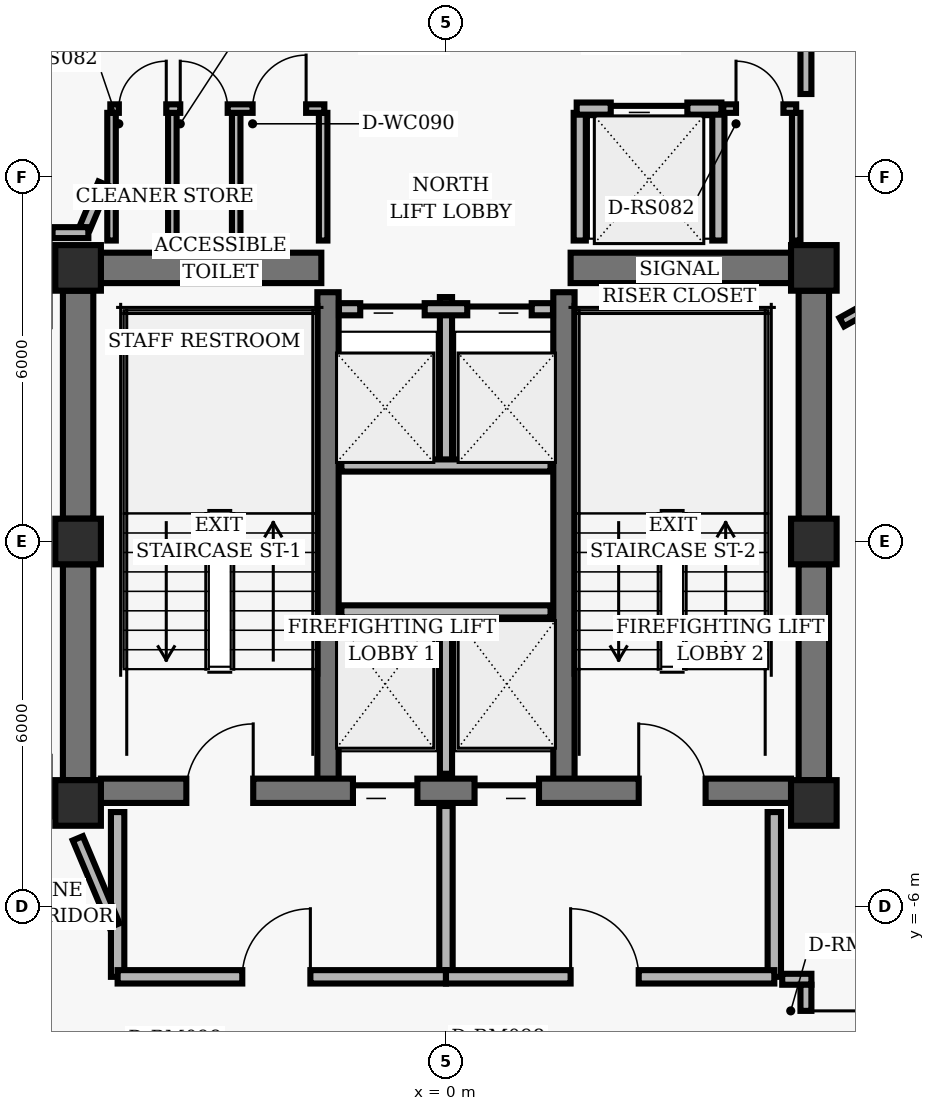
"""IFC4 building model, lengths in metres.
Left out: names, types, materials, properties, quantities, classifications, styles, units other than length and angle.
Written with IfcOpenShell. Run it as: python <this file> out.ifc"""

import sys

from ifc_helpers import new_model, si_unit, direction, frame, frame_2d, origin, origin_2d, place, context, subcontext, project, spatial, rectangle, hollow_rectangle, extrude, element, fill, save


model = new_model("IFC4")
c1 = context("Model", 3, precision=1e-05, world=origin(), true_north=direction((0.0, 1.0)))
c2 = subcontext(c1, "Body", "Model", "MODEL_VIEW")
j1 = project(units=[si_unit("LENGTHUNIT", "METRE"), si_unit("PLANEANGLEUNIT", "RADIAN")], contexts=[c1])
p1 = place(None, origin())
s1 = spatial("IfcSite", under=j1, at=p1, CompositionType="ELEMENT")
p2 = place(p1, origin())
s2 = spatial("IfcBuilding", under=s1, at=p2, CompositionType="ELEMENT")
p3 = place(p2, frame((0.0, 0.0, 181.44)))
s3 = spatial("IfcBuildingStorey", under=s2, at=p3, CompositionType="ELEMENT", Elevation=181.44)
for number, where, z_axis, x_axis in (
    (1, (-6.05, 4.5, 0.0), (0.0, 0.0, 1.0), (1.0, 0.0, 0.0)),
    (2, (6.05, 4.5, 0.0), (0.0, 0.0, 1.0), (1.0, 0.0, 0.0)),
    (3, (-6.05, 0.0, 0.0), (0.0, 0.0, 1.0), (1.0, 0.0, 0.0)),
    (4, (6.05, 0.0, 0.0), (0.0, 0.0, 1.0), (1.0, 0.0, 0.0)),
    (5, (-6.05, -4.3, 0.0), (0.0, 0.0, 1.0), (1.0, 0.0, 0.0)),
    (6, (6.05, -4.3, 0.0), (0.0, 0.0, 1.0), (1.0, 0.0, 0.0)),
):
    element("IfcColumn", number, at=place(p3, frame(where, z_axis=z_axis, x_axis=x_axis)), inside=s3, PredefinedType="COLUMN", context=c2, shape_type="SweptSolid", body=[
        extrude(hollow_rectangle(XDim=0.75, YDim=0.75, WallThickness=0.05, InnerFilletRadius=0.02, OuterFilletRadius=0.04, at=origin_2d()), origin(), (0.0, 0.0, 1.0), 3.04),
    ])
p4 = place(p3, frame((-6.05, 0.375, 0.0), z_axis=(0.0, 0.0, 1.0), x_axis=(0.0, 1.0, 0.0)))
e7 = element("IfcWall", 7, at=p4, inside=s3, PredefinedType="SHEAR", context=c2, shape_type="SweptSolid", body=[
    extrude(rectangle(XDim=3.75, YDim=0.5, at=frame_2d((1.875, 0.0))), origin(), (0.0, 0.0, 1.0), 2.798),
])
p5 = place(p3, frame((-6.05, -3.925, 0.0), z_axis=(0.0, 0.0, 1.0), x_axis=(0.0, 1.0, 0.0)))
e8 = element("IfcWall", 8, at=p5, inside=s3, PredefinedType="SHEAR", context=c2, shape_type="SweptSolid", body=[
    extrude(rectangle(XDim=3.55, YDim=0.5, at=frame_2d((1.775, 0.0))), origin(), (0.0, 0.0, 1.0), 2.798),
])
p6 = place(p3, frame((6.05, 0.375, 0.0), z_axis=(0.0, 0.0, 1.0), x_axis=(0.0, 1.0, 0.0)))
e9 = element("IfcWall", 9, at=p6, inside=s3, PredefinedType="SHEAR", context=c2, shape_type="SweptSolid", body=[
    extrude(rectangle(XDim=3.75, YDim=0.5, at=frame_2d((1.875, 0.0))), origin(), (0.0, 0.0, 1.0), 2.798),
])
p7 = place(p3, frame((6.05, -3.925, 0.0), z_axis=(0.0, 0.0, 1.0), x_axis=(0.0, 1.0, 0.0)))
e10 = element("IfcWall", 10, at=p7, inside=s3, PredefinedType="SHEAR", context=c2, shape_type="SweptSolid", body=[
    extrude(rectangle(XDim=3.55, YDim=0.5, at=frame_2d((1.775, 0.0))), origin(), (0.0, 0.0, 1.0), 2.798),
])
for number, where, z_axis, x_axis in (
    (11, (-1.94, -4.1, 0.0), (0.0, 0.0, 1.0), (0.0, 1.0, 0.0)),
    (12, (1.94, -4.1, 0.0), (0.0, 0.0, 1.0), (0.0, 1.0, 0.0)),
):
    element("IfcWall", number, at=place(p3, frame(where, z_axis=z_axis, x_axis=x_axis)), inside=s3, PredefinedType="SHEAR", context=c2, shape_type="SweptSolid", body=[
        extrude(rectangle(XDim=8.2, YDim=0.35, at=frame_2d((4.1, 0.0))), origin(), (0.0, 0.0, 1.0), 2.798),
    ])
p8 = place(p3, frame((-5.675, -4.1, 0.0), z_axis=(0.0, 0.0, 1.0), x_axis=(1.0, 0.0, 0.0)))
e13 = element("IfcWall", 13, at=p8, inside=s3, PredefinedType="SHEAR", context=c2, shape_type="SweptSolid", body=[
    extrude(rectangle(XDim=11.35, YDim=0.4, at=frame_2d((5.675, 0.0))), origin(), (0.0, 0.0, 1.0), 2.798),
])
p9 = place(p8, frame((1.405, 0.0, 0.0)))
e14 = element("IfcOpeningElement", 14, at=p9, cuts=e13, PredefinedType="OPENING", context=c2, shape_type="SweptSolid", body=[
    extrude(rectangle(XDim=1.1, YDim=2.04, at=frame_2d((0.55, 1.02))), frame((0.0, 0.21, 0.0), z_axis=(0.0, -1.0, 0.0), x_axis=(1.0, 0.0, 0.0)), (0.0, 0.0, 1.0), 0.42),
])
p10 = place(p8, frame((8.845, 0.0, 0.0)))
e15 = element("IfcOpeningElement", 15, at=p10, cuts=e13, PredefinedType="OPENING", context=c2, shape_type="SweptSolid", body=[
    extrude(rectangle(XDim=1.1, YDim=2.04, at=frame_2d((0.55, 1.02))), frame((0.0, 0.21, 0.0), z_axis=(0.0, -1.0, 0.0), x_axis=(1.0, 0.0, 0.0)), (0.0, 0.0, 1.0), 0.42),
])
p11 = place(p8, frame((4.145, 0.0, 0.0)))
e16 = element("IfcOpeningElement", 16, at=p11, cuts=e13, PredefinedType="OPENING", context=c2, shape_type="SweptSolid", body=[
    extrude(rectangle(XDim=1.06, YDim=2.04, at=frame_2d((0.53, 1.02))), frame((0.0, 0.21, 0.0), z_axis=(0.0, -1.0, 0.0), x_axis=(1.0, 0.0, 0.0)), (0.0, 0.0, 1.0), 0.42),
])
p12 = place(p8, frame((6.145, 0.0, 0.0)))
e17 = element("IfcOpeningElement", 17, at=p12, cuts=e13, PredefinedType="OPENING", context=c2, shape_type="SweptSolid", body=[
    extrude(rectangle(XDim=1.06, YDim=2.04, at=frame_2d((0.53, 1.02))), frame((0.0, 0.21, 0.0), z_axis=(0.0, -1.0, 0.0), x_axis=(1.0, 0.0, 0.0)), (0.0, 0.0, 1.0), 0.42),
])
for number, where, z_axis, x_axis in (
    (18, (-5.675, 4.5, 0.0), (0.0, 0.0, 1.0), (1.0, 0.0, 0.0)),
    (19, (2.05, 4.5, 0.0), (0.0, 0.0, 1.0), (1.0, 0.0, 0.0)),
):
    element("IfcWall", number, at=place(p3, frame(where, z_axis=z_axis, x_axis=x_axis)), inside=s3, PredefinedType="SHEAR", context=c2, shape_type="SweptSolid", body=[
        extrude(rectangle(XDim=3.625, YDim=0.5, at=frame_2d((1.812, 0.0))), origin(), (0.0, 0.0, 1.0), 2.798),
    ])
p13 = place(p3, frame((0.0, -3.82, 0.0), z_axis=(0.0, 0.0, 1.0), x_axis=(0.0, 1.0, 0.0)))
e20 = element("IfcWall", 20, at=p13, inside=s3, PredefinedType="PARTITIONING", context=c2, shape_type="SweptSolid", body=[
    extrude(rectangle(XDim=2.67, YDim=0.2, at=frame_2d((1.335, 0.0))), origin(), (0.0, 0.0, 1.0), 2.773),
])
p14 = place(p3, frame((-1.72, -1.15, 0.0), z_axis=(0.0, 0.0, 1.0), x_axis=(1.0, 0.0, 0.0)))
e21 = element("IfcWall", 21, at=p14, inside=s3, PredefinedType="PARTITIONING", context=c2, shape_type="SweptSolid", body=[
    extrude(rectangle(XDim=3.44, YDim=0.2, at=frame_2d((1.72, 0.0))), origin(), (0.0, 0.0, 1.0), 2.773),
])
for number, where, z_axis, x_axis in (
    (22, (-5.4, -7.16, 0.0), (0.0, 0.0, 1.0), (0.0, 1.0, 0.0)),
    (23, (5.4, -7.16, 0.0), (0.0, 0.0, 1.0), (0.0, 1.0, 0.0)),
):
    element("IfcWall", number, at=place(p3, frame(where, z_axis=z_axis, x_axis=x_axis)), inside=s3, PredefinedType="PARTITIONING", context=c2, shape_type="SweptSolid", body=[
        extrude(rectangle(XDim=2.71, YDim=0.22, at=frame_2d((1.355, 0.0))), origin(), (0.0, 0.0, 1.0), 2.773),
    ])
p15 = place(p3, frame((0.0, -7.16, 0.0), z_axis=(0.0, 0.0, 1.0), x_axis=(0.0, 1.0, 0.0)))
e24 = element("IfcWall", 24, at=p15, inside=s3, PredefinedType="PARTITIONING", context=c2, shape_type="SweptSolid", body=[
    extrude(rectangle(XDim=2.81, YDim=0.22, at=frame_2d((1.405, 0.0))), origin(), (0.0, 0.0, 1.0), 2.773),
])
p16 = place(p3, frame((-5.4, -7.16, 0.0), z_axis=(0.0, 0.0, 1.0), x_axis=(1.0, 0.0, 0.0)))
e25 = element("IfcWall", 25, at=p16, inside=s3, PredefinedType="PARTITIONING", context=c2, shape_type="SweptSolid", body=[
    extrude(rectangle(XDim=5.4, YDim=0.22, at=frame_2d((2.7, 0.0))), origin(), (0.0, 0.0, 1.0), 2.395),
])
p17 = place(p16, frame((2.05, 0.0, 0.0)))
e26 = element("IfcOpeningElement", 26, at=p17, cuts=e25, PredefinedType="OPENING", context=c2, shape_type="SweptSolid", body=[
    extrude(rectangle(XDim=1.12, YDim=2.02, at=frame_2d((0.56, 1.01))), frame((0.0, 0.12, 0.0), z_axis=(0.0, -1.0, 0.0), x_axis=(1.0, 0.0, 0.0)), (0.0, 0.0, 1.0), 0.24),
])
p18 = place(p3, frame((0.0, -7.16, 0.0), z_axis=(0.0, 0.0, 1.0), x_axis=(1.0, 0.0, 0.0)))
e27 = element("IfcWall", 27, at=p18, inside=s3, PredefinedType="PARTITIONING", context=c2, shape_type="SweptSolid", body=[
    extrude(rectangle(XDim=5.4, YDim=0.22, at=frame_2d((2.7, 0.0))), origin(), (0.0, 0.0, 1.0), 2.395),
])
p19 = place(p18, frame((2.05, 0.0, 0.0)))
e28 = element("IfcOpeningElement", 28, at=p19, cuts=e27, PredefinedType="OPENING", context=c2, shape_type="SweptSolid", body=[
    extrude(rectangle(XDim=1.12, YDim=2.02, at=frame_2d((0.56, 1.01))), frame((0.0, 0.12, 0.0), z_axis=(0.0, -1.0, 0.0), x_axis=(1.0, 0.0, 0.0)), (0.0, 0.0, 1.0), 0.24),
])
p20 = place(p3, frame((0.0, 1.25, 0.0), z_axis=(0.0, 0.0, 1.0), x_axis=(0.0, 1.0, 0.0)))
e29 = element("IfcWall", 29, at=p20, inside=s3, PredefinedType="PARTITIONING", context=c2, shape_type="SweptSolid", body=[
    extrude(rectangle(XDim=2.77, YDim=0.2, at=frame_2d((1.385, 0.0))), origin(), (0.0, 0.0, 1.0), 2.773),
])
p21 = place(p3, frame((-1.72, 1.25, 0.0), z_axis=(0.0, 0.0, 1.0), x_axis=(1.0, 0.0, 0.0)))
e30 = element("IfcWall", 30, at=p21, inside=s3, PredefinedType="PARTITIONING", context=c2, shape_type="SweptSolid", body=[
    extrude(rectangle(XDim=3.44, YDim=0.2, at=frame_2d((1.72, 0.0))), origin(), (0.0, 0.0, 1.0), 2.773),
])
p22 = place(p3, frame((-1.76, 3.82, 0.0), z_axis=(0.0, 0.0, 1.0), x_axis=(1.0, 0.0, 0.0)))
e31 = element("IfcWall", 31, at=p22, inside=s3, PredefinedType="PARTITIONING", context=c2, shape_type="SweptSolid", body=[
    extrude(rectangle(XDim=3.52, YDim=0.2, at=frame_2d((1.76, 0.0))), origin(), (0.0, 0.0, 1.0), 2.773),
])
p23 = place(p22, frame((0.35, 0.0, 0.0)))
e32 = element("IfcOpeningElement", 32, at=p23, cuts=e31, PredefinedType="OPENING", context=c2, shape_type="SweptSolid", body=[
    extrude(rectangle(XDim=1.06, YDim=2.04, at=frame_2d((0.53, 1.02))), frame((0.0, 0.11, 0.0), z_axis=(0.0, -1.0, 0.0), x_axis=(1.0, 0.0, 0.0)), (0.0, 0.0, 1.0), 0.22),
])
p24 = place(p22, frame((2.11, 0.0, 0.0)))
e33 = element("IfcOpeningElement", 33, at=p24, cuts=e31, PredefinedType="OPENING", context=c2, shape_type="SweptSolid", body=[
    extrude(rectangle(XDim=1.06, YDim=2.04, at=frame_2d((0.53, 1.02))), frame((0.0, 0.11, 0.0), z_axis=(0.0, -1.0, 0.0), x_axis=(1.0, 0.0, 0.0)), (0.0, 0.0, 1.0), 0.22),
])
for number, where, z_axis, x_axis in (
    (34, (2.2, 4.95, 0.0), (0.0, 0.0, 1.0), (0.0, 1.0, 0.0)),
    (35, (4.48, 4.95, 0.0), (0.0, 0.0, 1.0), (0.0, 1.0, 0.0)),
):
    element("IfcWall", number, at=place(p3, frame(where, z_axis=z_axis, x_axis=x_axis)), inside=s3, PredefinedType="PARTITIONING", context=c2, shape_type="SweptSolid", body=[
        extrude(rectangle(XDim=2.1, YDim=0.2, at=frame_2d((1.05, 0.0))), origin(), (0.0, 0.0, 1.0), 2.773),
    ])
p25 = place(p3, frame((2.15, 7.12, 0.0), z_axis=(0.0, 0.0, 1.0), x_axis=(1.0, 0.0, 0.0)))
e36 = element("IfcWall", 36, at=p25, inside=s3, PredefinedType="PARTITIONING", context=c2, shape_type="SweptSolid", body=[
    extrude(rectangle(XDim=2.38, YDim=0.2, at=frame_2d((1.19, 0.0))), origin(), (0.0, 0.0, 1.0), 2.773),
])
p26 = place(p25, frame((0.56, 0.0, 0.0)))
e37 = element("IfcOpeningElement", 37, at=p26, cuts=e36, PredefinedType="OPENING", context=c2, shape_type="SweptSolid", body=[
    extrude(rectangle(XDim=1.26, YDim=2.06, at=frame_2d((0.63, 1.03))), frame((0.0, 0.11, 0.0), z_axis=(0.0, -1.0, 0.0), x_axis=(1.0, 0.0, 0.0)), (0.0, 0.0, 1.0), 0.22),
])
for number, where, z_axis, x_axis in (
    (38, (-5.5, 4.95, 0.0), (0.0, 0.0, 1.0), (0.0, 1.0, 0.0)),
    (39, (-4.5, 4.95, 0.0), (0.0, 0.0, 1.0), (0.0, 1.0, 0.0)),
    (40, (-3.45, 4.95, 0.0), (0.0, 0.0, 1.0), (0.0, 1.0, 0.0)),
    (41, (-2.02, 4.95, 0.0), (0.0, 0.0, 1.0), (0.0, 1.0, 0.0)),
):
    element("IfcWall", number, at=place(p3, frame(where, z_axis=z_axis, x_axis=x_axis)), inside=s3, PredefinedType="PARTITIONING", context=c2, shape_type="SweptSolid", body=[
        extrude(rectangle(XDim=2.1, YDim=0.14, at=frame_2d((1.05, 0.0))), origin(), (0.0, 0.0, 1.0), 2.773),
    ])
p27 = place(p3, frame((-5.52, 7.12, 0.0), z_axis=(0.0, 0.0, 1.0), x_axis=(1.0, 0.0, 0.0)))
e42 = element("IfcWall", 42, at=p27, inside=s3, PredefinedType="PARTITIONING", context=c2, shape_type="SweptSolid", body=[
    extrude(rectangle(XDim=3.52, YDim=0.14, at=frame_2d((1.76, 0.0))), origin(), (0.0, 0.0, 1.0), 2.773),
])
p28 = place(p27, frame((0.14, 0.0, 0.0)))
e43 = element("IfcOpeningElement", 43, at=p28, cuts=e42, PredefinedType="OPENING", context=c2, shape_type="SweptSolid", body=[
    extrude(rectangle(XDim=0.78, YDim=2.01, at=frame_2d((0.39, 1.005))), frame((0.0, 0.08, 0.0), z_axis=(0.0, -1.0, 0.0), x_axis=(1.0, 0.0, 0.0)), (0.0, 0.0, 1.0), 0.16),
])
p29 = place(p27, frame((1.15, 0.0, 0.0)))
e44 = element("IfcOpeningElement", 44, at=p29, cuts=e42, PredefinedType="OPENING", context=c2, shape_type="SweptSolid", body=[
    extrude(rectangle(XDim=0.78, YDim=2.01, at=frame_2d((0.39, 1.005))), frame((0.0, 0.08, 0.0), z_axis=(0.0, -1.0, 0.0), x_axis=(1.0, 0.0, 0.0)), (0.0, 0.0, 1.0), 0.16),
])
p30 = place(p27, frame((2.34, 0.0, 0.0)))
e45 = element("IfcOpeningElement", 45, at=p30, cuts=e42, PredefinedType="OPENING", context=c2, shape_type="SweptSolid", body=[
    extrude(rectangle(XDim=0.88, YDim=2.02, at=frame_2d((0.44, 1.01))), frame((0.0, 0.08, 0.0), z_axis=(0.0, -1.0, 0.0), x_axis=(1.0, 0.0, 0.0)), (0.0, 0.0, 1.0), 0.16),
])
p31 = place(p3, frame((5.76, 4.95, 0.0), z_axis=(0.0, 0.0, 1.0), x_axis=(0.0, 1.0, 0.0)))
e46 = element("IfcWall", 46, at=p31, inside=s3, PredefinedType="PARTITIONING", context=c2, shape_type="SweptSolid", body=[
    extrude(rectangle(XDim=2.1, YDim=0.14, at=frame_2d((1.05, 0.0))), origin(), (0.0, 0.0, 1.0), 2.253),
])
p32 = place(p3, frame((4.56, 7.12, 0.0), z_axis=(0.0, 0.0, 1.0), x_axis=(1.0, 0.0, 0.0)))
e47 = element("IfcWall", 47, at=p32, inside=s3, PredefinedType="PARTITIONING", context=c2, shape_type="SweptSolid", body=[
    extrude(rectangle(XDim=1.2, YDim=0.14, at=frame_2d((0.6, 0.0))), origin(), (0.0, 0.0, 1.0), 2.773),
])
p33 = place(p32, frame((0.21, 0.0, 0.0)))
e48 = element("IfcOpeningElement", 48, at=p33, cuts=e47, PredefinedType="OPENING", context=c2, shape_type="SweptSolid", body=[
    extrude(rectangle(XDim=0.78, YDim=2.01, at=frame_2d((0.39, 1.005))), frame((0.0, 0.08, 0.0), z_axis=(0.0, -1.0, 0.0), x_axis=(1.0, 0.0, 0.0)), (0.0, 0.0, 1.0), 0.16),
])
p34 = place(p3, frame((5.92, 9.16, 0.0), z_axis=(0.0, 0.0, 1.0), x_axis=(0.0, -1.0, 0.0)))
e49 = element("IfcWall", 49, at=p34, inside=s3, PredefinedType="PARTITIONING", context=c2, shape_type="SweptSolid", body=[
    extrude(rectangle(XDim=1.8, YDim=0.18, at=frame_2d((0.9, 0.0))), origin(), (0.0, 0.0, 1.0), 2.253),
])
p35 = place(p3, frame((-5.632, 5.887, 0.0), z_axis=(0.0, 0.0, 1.0), x_axis=(-0.387792833522, -0.921746558588, 0.0)))
e50 = element("IfcWall", 50, at=p35, inside=s3, PredefinedType="PARTITIONING", context=c2, shape_type="SweptSolid", body=[
    extrude(rectangle(XDim=0.785, YDim=0.18, at=frame_2d((0.393, 0.0))), origin(), (0.0, 0.0, 1.0), 2.773),
])
p36 = place(p3, frame((-5.881, 5.08, 0.0), z_axis=(0.0, 0.0, 1.0), x_axis=(-1.0, 0.0, 0.0)))
e51 = element("IfcWall", 51, at=p36, inside=s3, PredefinedType="PARTITIONING", context=c2, shape_type="SweptSolid", body=[
    extrude(rectangle(XDim=0.589, YDim=0.18, at=frame_2d((0.294, 0.0))), origin(), (0.0, 0.0, 1.0), 2.773),
])
p37 = place(p3, frame((-6.055, -4.882, 0.0), z_axis=(0.0, 0.0, 1.0), x_axis=(0.387579540458, -0.921836265189, 0.0)))
e52 = element("IfcWall", 52, at=p37, inside=s3, PredefinedType="PARTITIONING", context=c2, shape_type="SweptSolid", body=[
    extrude(rectangle(XDim=1.555, YDim=0.18, at=frame_2d((0.777, 0.0))), origin(), (0.0, 0.0, 1.0), 2.773),
])
p38 = place(p3, frame((5.53, -7.2, 0.0), z_axis=(0.0, 0.0, 1.0), x_axis=(1.0, 0.0, 0.0)))
e53 = element("IfcWall", 53, at=p38, inside=s3, PredefinedType="PARTITIONING", context=c2, shape_type="SweptSolid", body=[
    extrude(rectangle(XDim=0.48, YDim=0.18, at=frame_2d((0.24, 0.0))), origin(), (0.0, 0.0, 1.0), 2.773),
])
p39 = place(p3, frame((5.92, -7.29, 0.0), z_axis=(0.0, 0.0, 1.0), x_axis=(0.0, -1.0, 0.0)))
e54 = element("IfcWall", 54, at=p39, inside=s3, PredefinedType="PARTITIONING", context=c2, shape_type="SweptSolid", body=[
    extrude(rectangle(XDim=1.82, YDim=0.18, at=frame_2d((0.91, 0.0))), origin(), (0.0, 0.0, 1.0), 2.773),
])
p40 = place(p39, frame((0.43, 0.0, 0.0)))
e55 = element("IfcOpeningElement", 55, at=p40, cuts=e54, PredefinedType="OPENING", context=c2, shape_type="SweptSolid", body=[
    extrude(rectangle(XDim=0.96, YDim=2.02, at=frame_2d((0.48, 1.01))), frame((0.0, 0.1, 0.0), z_axis=(0.0, -1.0, 0.0), x_axis=(1.0, 0.0, 0.0)), (0.0, 0.0, 1.0), 0.2),
])
p41 = place(p3, frame((6.51, 3.609, 0.0), z_axis=(0.0, 0.0, 1.0), x_axis=(0.874634801292, 0.484782388675, 0.0)))
e56 = element("IfcWall", 56, at=p41, inside=s3, PredefinedType="PARTITIONING", context=c2, shape_type="SweptSolid", body=[
    extrude(rectangle(XDim=5.879, YDim=0.16, at=frame_2d((2.939, 0.0))), origin(), (0.0, 0.0, 1.0), 2.773),
])
p42 = place(p9, origin())
e57 = element("IfcDoor", 57, at=p42, inside=s3, OperationType="SINGLE_SWING_RIGHT", PredefinedType="DOOR", context=c2, shape_type="SweptSolid", body=[
    extrude(rectangle(XDim=1.1, YDim=2.04, at=frame_2d((0.55, 1.02))), frame((0.0, 0.025, 0.0), z_axis=(0.0, -1.0, 0.0), x_axis=(1.0, 0.0, 0.0)), (0.0, 0.0, 1.0), 0.05),
])
fill(e14, e57)
p43 = place(p10, origin())
e58 = element("IfcDoor", 58, at=p43, inside=s3, OperationType="SINGLE_SWING_LEFT", PredefinedType="DOOR", context=c2, shape_type="SweptSolid", body=[
    extrude(rectangle(XDim=1.1, YDim=2.04, at=frame_2d((0.55, 1.02))), frame((0.0, 0.025, 0.0), z_axis=(0.0, -1.0, 0.0), x_axis=(1.0, 0.0, 0.0)), (0.0, 0.0, 1.0), 0.05),
])
fill(e15, e58)
p44 = place(p11, origin())
e59 = element("IfcDoor", 59, at=p44, inside=s3, OperationType="SLIDING_TO_LEFT", PredefinedType="DOOR", context=c2, shape_type="SweptSolid", body=[
    extrude(rectangle(XDim=1.06, YDim=2.04, at=frame_2d((0.53, 1.02))), frame((0.0, 0.025, 0.0), z_axis=(0.0, -1.0, 0.0), x_axis=(1.0, 0.0, 0.0)), (0.0, 0.0, 1.0), 0.05),
])
fill(e16, e59)
p45 = place(p12, origin())
e60 = element("IfcDoor", 60, at=p45, inside=s3, OperationType="SLIDING_TO_RIGHT", PredefinedType="DOOR", context=c2, shape_type="SweptSolid", body=[
    extrude(rectangle(XDim=1.06, YDim=2.04, at=frame_2d((0.53, 1.02))), frame((0.0, 0.025, 0.0), z_axis=(0.0, -1.0, 0.0), x_axis=(1.0, 0.0, 0.0)), (0.0, 0.0, 1.0), 0.05),
])
fill(e17, e60)
p46 = place(p17, origin())
e61 = element("IfcDoor", 61, at=p46, inside=s3, OperationType="SINGLE_SWING_RIGHT", PredefinedType="DOOR", context=c2, shape_type="SweptSolid", body=[
    extrude(rectangle(XDim=1.12, YDim=2.02, at=frame_2d((0.56, 1.01))), frame((0.0, 0.025, 0.0), z_axis=(0.0, -1.0, 0.0), x_axis=(1.0, 0.0, 0.0)), (0.0, 0.0, 1.0), 0.05),
])
fill(e26, e61)
p47 = place(p19, origin())
e62 = element("IfcDoor", 62, at=p47, inside=s3, OperationType="SINGLE_SWING_LEFT", PredefinedType="DOOR", context=c2, shape_type="SweptSolid", body=[
    extrude(rectangle(XDim=1.12, YDim=2.02, at=frame_2d((0.56, 1.01))), frame((0.0, 0.025, 0.0), z_axis=(0.0, -1.0, 0.0), x_axis=(1.0, 0.0, 0.0)), (0.0, 0.0, 1.0), 0.05),
])
fill(e28, e62)
p48 = place(p23, origin())
e63 = element("IfcDoor", 63, at=p48, inside=s3, OperationType="SLIDING_TO_LEFT", PredefinedType="DOOR", context=c2, shape_type="SweptSolid", body=[
    extrude(rectangle(XDim=1.06, YDim=2.04, at=frame_2d((0.53, 1.02))), frame((0.0, 0.025, 0.0), z_axis=(0.0, -1.0, 0.0), x_axis=(1.0, 0.0, 0.0)), (0.0, 0.0, 1.0), 0.05),
])
fill(e32, e63)
p49 = place(p24, origin())
e64 = element("IfcDoor", 64, at=p49, inside=s3, OperationType="SLIDING_TO_RIGHT", PredefinedType="DOOR", context=c2, shape_type="SweptSolid", body=[
    extrude(rectangle(XDim=1.06, YDim=2.04, at=frame_2d((0.53, 1.02))), frame((0.0, 0.025, 0.0), z_axis=(0.0, -1.0, 0.0), x_axis=(1.0, 0.0, 0.0)), (0.0, 0.0, 1.0), 0.05),
])
fill(e33, e64)
p50 = place(p26, origin())
e65 = element("IfcDoor", 65, at=p50, inside=s3, OperationType="SLIDING_TO_LEFT", PredefinedType="DOOR", context=c2, shape_type="SweptSolid", body=[
    extrude(rectangle(XDim=1.26, YDim=2.06, at=frame_2d((0.63, 1.03))), frame((0.0, 0.025, 0.0), z_axis=(0.0, -1.0, 0.0), x_axis=(1.0, 0.0, 0.0)), (0.0, 0.0, 1.0), 0.05),
])
fill(e37, e65)
p51 = place(p28, origin())
e66 = element("IfcDoor", 66, at=p51, inside=s3, OperationType="SINGLE_SWING_RIGHT", PredefinedType="DOOR", context=c2, shape_type="SweptSolid", body=[
    extrude(rectangle(XDim=0.78, YDim=2.01, at=frame_2d((0.39, 1.005))), frame((0.0, 0.025, 0.0), z_axis=(0.0, -1.0, 0.0), x_axis=(1.0, 0.0, 0.0)), (0.0, 0.0, 1.0), 0.05),
])
fill(e43, e66)
p52 = place(p29, origin())
e67 = element("IfcDoor", 67, at=p52, inside=s3, OperationType="SINGLE_SWING_LEFT", PredefinedType="DOOR", context=c2, shape_type="SweptSolid", body=[
    extrude(rectangle(XDim=0.78, YDim=2.01, at=frame_2d((0.39, 1.005))), frame((0.0, 0.025, 0.0), z_axis=(0.0, -1.0, 0.0), x_axis=(1.0, 0.0, 0.0)), (0.0, 0.0, 1.0), 0.05),
])
fill(e44, e67)
p53 = place(p30, origin())
e68 = element("IfcDoor", 68, at=p53, inside=s3, OperationType="SINGLE_SWING_RIGHT", PredefinedType="DOOR", context=c2, shape_type="SweptSolid", body=[
    extrude(rectangle(XDim=0.88, YDim=2.02, at=frame_2d((0.44, 1.01))), frame((0.0, 0.025, 0.0), z_axis=(0.0, -1.0, 0.0), x_axis=(1.0, 0.0, 0.0)), (0.0, 0.0, 1.0), 0.05),
])
fill(e45, e68)
p54 = place(p33, origin())
e69 = element("IfcDoor", 69, at=p54, inside=s3, OperationType="SINGLE_SWING_LEFT", PredefinedType="DOOR", context=c2, shape_type="SweptSolid", body=[
    extrude(rectangle(XDim=0.78, YDim=2.01, at=frame_2d((0.39, 1.005))), frame((0.0, 0.025, 0.0), z_axis=(0.0, -1.0, 0.0), x_axis=(1.0, 0.0, 0.0)), (0.0, 0.0, 1.0), 0.05),
])
fill(e48, e69)
p55 = place(p40, origin())
e70 = element("IfcDoor", 70, at=p55, inside=s3, OperationType="SINGLE_SWING_LEFT", PredefinedType="DOOR", context=c2, shape_type="SweptSolid", body=[
    extrude(rectangle(XDim=0.96, YDim=2.02, at=frame_2d((0.48, 1.01))), frame((0.0, 0.025, 0.0), z_axis=(0.0, -1.0, 0.0), x_axis=(1.0, 0.0, 0.0)), (0.0, 0.0, 1.0), 0.05),
])
fill(e55, e70)
save(model, sys.argv[1])
